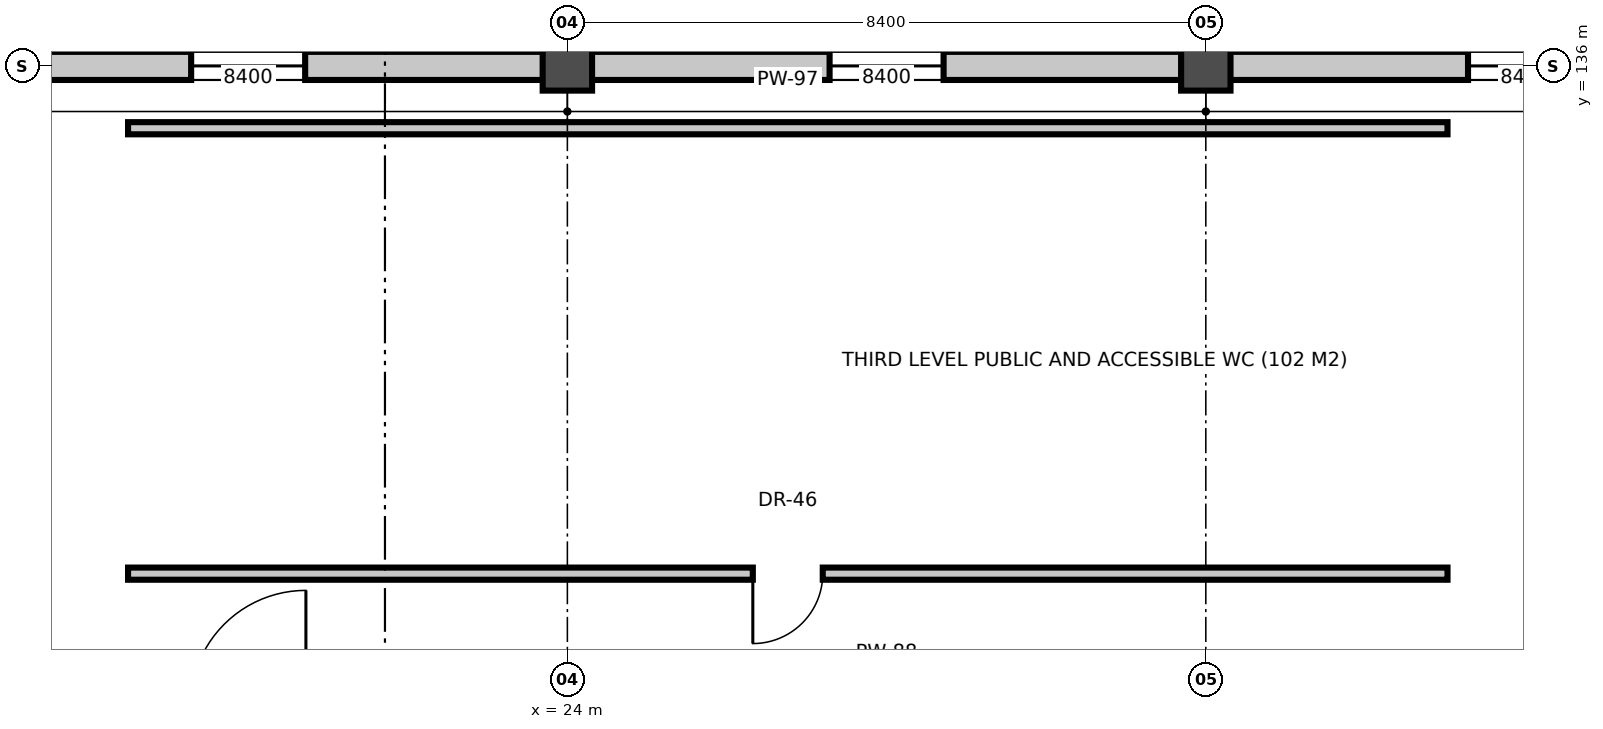
"""IFC4 building model, lengths in metres.
Left out: names, types, materials, properties, quantities, classifications, styles, units other than length and angle.
Written with IfcOpenShell. Run it as: python <this file> out.ifc"""

import sys

from ifc_helpers import new_model, si_unit, direction, frame, frame_2d, origin, origin_2d, place, context, subcontext, project, spatial, rectangle, extrude, element, fill, save


model = new_model("IFC4")
c1 = context("Model", 3, precision=1e-05, world=origin(), true_north=direction((0.0, 1.0)))
c2 = subcontext(c1, "Body", "Model", "MODEL_VIEW")
j1 = project(units=[si_unit("LENGTHUNIT", "METRE"), si_unit("PLANEANGLEUNIT", "RADIAN")], contexts=[c1])
p1 = place(None, origin())
s1 = spatial("IfcSite", under=j1, at=p1, CompositionType="ELEMENT")
p2 = place(p1, origin())
s2 = spatial("IfcBuilding", under=s1, at=p2, CompositionType="ELEMENT")
p3 = place(p2, frame((0.0, 0.0, 15.0)))
s3 = spatial("IfcBuildingStorey", under=s2, at=p3, CompositionType="ELEMENT", Elevation=15.0)
for number, where, z_axis, x_axis in (
    (1, (24.0, 136.0, 0.0), (0.0, 0.0, 1.0), (1.0, 0.0, 0.0)),
    (2, (32.4, 136.0, 0.0), (0.0, 0.0, 1.0), (1.0, 0.0, 0.0)),
):
    element("IfcColumn", number, at=place(p3, frame(where, z_axis=z_axis, x_axis=x_axis)), inside=s3, PredefinedType="COLUMN", context=c2, shape_type="SweptSolid", body=[
        extrude(rectangle(XDim=0.65, YDim=0.65, at=origin_2d()), origin(), (0.0, 0.0, 1.0), 4.5),
    ])
p4 = place(p3, frame((15.905, 136.0, 0.0), z_axis=(0.0, 0.0, 1.0), x_axis=(1.0, 0.0, 0.0)))
e3 = element("IfcWall", 3, at=p4, inside=s3, PredefinedType="SOLIDWALL", context=c2, shape_type="SweptSolid", body=[
    extrude(rectangle(XDim=7.79, YDim=0.37, at=frame_2d((3.895, 0.0))), origin(), (0.0, 0.0, 1.0), 3.536),
])
p5 = place(p4, frame((3.145, 0.0, 1.0)))
e4 = element("IfcOpeningElement", 4, at=p5, cuts=e3, PredefinedType="OPENING", context=c2, shape_type="SweptSolid", body=[
    extrude(rectangle(XDim=1.5, YDim=1.95, at=frame_2d((0.75, 0.975))), frame((0.0, 0.195, 0.0), z_axis=(0.0, -1.0, 0.0), x_axis=(1.0, 0.0, 0.0)), (0.0, 0.0, 1.0), 0.39),
])
p6 = place(p3, frame((24.305, 136.0, 0.0), z_axis=(0.0, 0.0, 1.0), x_axis=(1.0, 0.0, 0.0)))
e5 = element("IfcWall", 5, at=p6, inside=s3, PredefinedType="SOLIDWALL", context=c2, shape_type="SweptSolid", body=[
    extrude(rectangle(XDim=7.79, YDim=0.37, at=frame_2d((3.895, 0.0))), origin(), (0.0, 0.0, 1.0), 3.595),
])
p7 = place(p6, frame((3.145, 0.0, 1.0)))
e6 = element("IfcOpeningElement", 6, at=p7, cuts=e5, PredefinedType="OPENING", context=c2, shape_type="SweptSolid", body=[
    extrude(rectangle(XDim=1.5, YDim=1.95, at=frame_2d((0.75, 0.975))), frame((0.0, 0.195, 0.0), z_axis=(0.0, -1.0, 0.0), x_axis=(1.0, 0.0, 0.0)), (0.0, 0.0, 1.0), 0.39),
])
p8 = place(p3, frame((32.705, 136.0, 0.0), z_axis=(0.0, 0.0, 1.0), x_axis=(1.0, 0.0, 0.0)))
e7 = element("IfcWall", 7, at=p8, inside=s3, PredefinedType="SOLIDWALL", context=c2, shape_type="SweptSolid", body=[
    extrude(rectangle(XDim=7.79, YDim=0.37, at=frame_2d((3.895, 0.0))), origin(), (0.0, 0.0, 1.0), 3.394),
])
p9 = place(p8, frame((3.145, 0.0, 1.0)))
e8 = element("IfcOpeningElement", 8, at=p9, cuts=e7, PredefinedType="OPENING", context=c2, shape_type="SweptSolid", body=[
    extrude(rectangle(XDim=1.5, YDim=1.95, at=frame_2d((0.75, 0.975))), frame((0.0, 0.195, 0.0), z_axis=(0.0, -1.0, 0.0), x_axis=(1.0, 0.0, 0.0)), (0.0, 0.0, 1.0), 0.39),
])
p10 = place(p3, frame((18.22, 135.18, 0.0), z_axis=(0.0, 0.0, 1.0), x_axis=(1.0, 0.0, 0.0)))
e9 = element("IfcWall", 9, at=p10, inside=s3, PredefinedType="PARTITIONING", context=c2, shape_type="SweptSolid", body=[
    extrude(rectangle(XDim=17.36, YDim=0.16, at=frame_2d((8.68, 0.0))), origin(), (0.0, 0.0, 1.0), 3.13),
])
p11 = place(p3, frame((35.58, 129.32, 0.0), z_axis=(0.0, 0.0, 1.0), x_axis=(-1.0, 0.0, 0.0)))
e10 = element("IfcWall", 10, at=p11, inside=s3, PredefinedType="PARTITIONING", context=c2, shape_type="SweptSolid", body=[
    extrude(rectangle(XDim=17.36, YDim=0.16, at=frame_2d((8.68, 0.0))), origin(), (0.0, 0.0, 1.0), 3.13),
])
p12 = place(p11, frame((8.22, 0.0, 0.0)))
e11 = element("IfcOpeningElement", 11, at=p12, cuts=e10, PredefinedType="OPENING", context=c2, shape_type="SweptSolid", body=[
    extrude(rectangle(XDim=0.92, YDim=2.12, at=frame_2d((0.46, 1.06))), frame((0.0, 0.09, 0.0), z_axis=(0.0, -1.0, 0.0), x_axis=(1.0, 0.0, 0.0)), (0.0, 0.0, 1.0), 0.18),
])
p13 = place(p5, origin())
e12 = element("IfcWindow", 12, at=p13, inside=s3, PartitioningType="SINGLE_PANEL", PredefinedType="WINDOW", context=c2, shape_type="SweptSolid", body=[
    extrude(rectangle(XDim=1.5, YDim=1.95, at=frame_2d((0.75, 0.975))), frame((0.0, 0.03, 0.0), z_axis=(0.0, -1.0, 0.0), x_axis=(1.0, 0.0, 0.0)), (0.0, 0.0, 1.0), 0.06),
])
fill(e4, e12)
p14 = place(p7, origin())
e13 = element("IfcWindow", 13, at=p14, inside=s3, PartitioningType="SINGLE_PANEL", PredefinedType="WINDOW", context=c2, shape_type="SweptSolid", body=[
    extrude(rectangle(XDim=1.5, YDim=1.95, at=frame_2d((0.75, 0.975))), frame((0.0, 0.03, 0.0), z_axis=(0.0, -1.0, 0.0), x_axis=(1.0, 0.0, 0.0)), (0.0, 0.0, 1.0), 0.06),
])
fill(e6, e13)
p15 = place(p9, origin())
e14 = element("IfcWindow", 14, at=p15, inside=s3, PartitioningType="SINGLE_PANEL", PredefinedType="WINDOW", context=c2, shape_type="SweptSolid", body=[
    extrude(rectangle(XDim=1.5, YDim=1.95, at=frame_2d((0.75, 0.975))), frame((0.0, 0.03, 0.0), z_axis=(0.0, -1.0, 0.0), x_axis=(1.0, 0.0, 0.0)), (0.0, 0.0, 1.0), 0.06),
])
fill(e8, e14)
p16 = place(p12, origin())
e15 = element("IfcDoor", 15, at=p16, inside=s3, OperationType="SINGLE_SWING_RIGHT", PredefinedType="DOOR", context=c2, shape_type="SweptSolid", body=[
    extrude(rectangle(XDim=0.92, YDim=2.12, at=frame_2d((0.46, 1.06))), frame((0.0, 0.025, 0.0), z_axis=(0.0, -1.0, 0.0), x_axis=(1.0, 0.0, 0.0)), (0.0, 0.0, 1.0), 0.05),
])
fill(e11, e15)
save(model, sys.argv[1])
